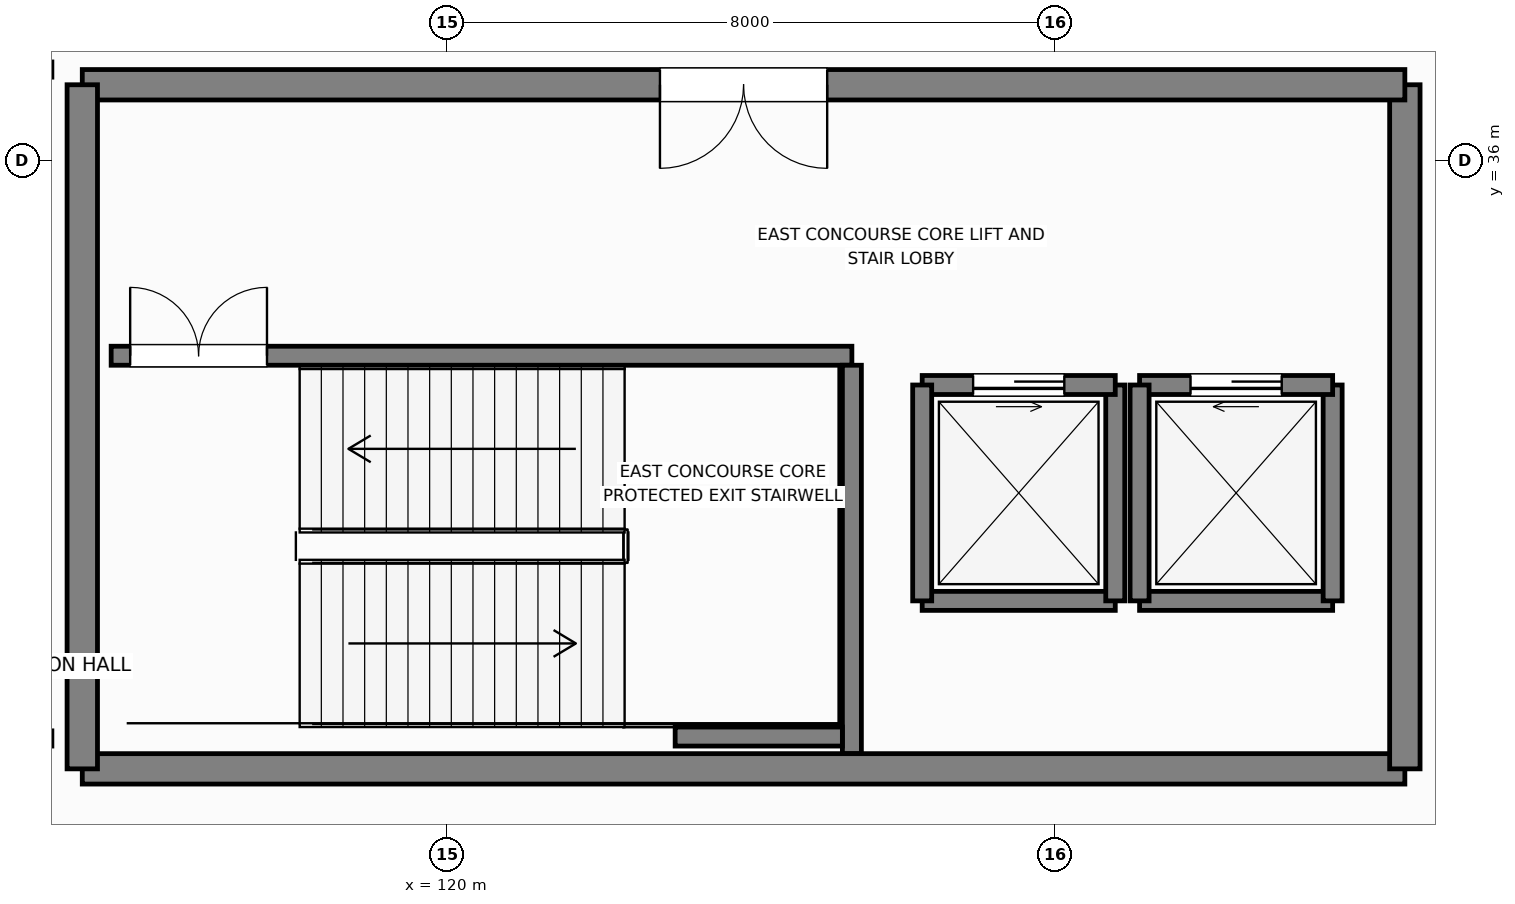
"""IFC4 building model, lengths in metres.
Left out: names, types, materials, properties, quantities, classifications, styles, units other than length and angle.
Written with IfcOpenShell. Run it as: python <this file> out.ifc"""

import sys

from ifc_helpers import new_model, si_unit, direction, frame, frame_2d, origin, place, context, subcontext, project, spatial, rectangle, extrude, element, fill, save


model = new_model("IFC4")
c1 = context("Model", 3, precision=1e-05, world=origin(), true_north=direction((0.0, 1.0)))
c2 = subcontext(c1, "Body", "Model", "MODEL_VIEW")
j1 = project(units=[si_unit("LENGTHUNIT", "METRE"), si_unit("PLANEANGLEUNIT", "RADIAN")], contexts=[c1])
p1 = place(None, origin())
s1 = spatial("IfcSite", under=j1, at=p1, CompositionType="ELEMENT")
p2 = place(p1, origin())
s2 = spatial("IfcBuilding", under=s1, at=p2, CompositionType="ELEMENT")
p3 = place(p2, frame((0.0, 0.0, -5.4)))
s3 = spatial("IfcBuildingStorey", under=s2, at=p3, CompositionType="ELEMENT", Elevation=-5.4)
p4 = place(p3, frame((126.25, 30.21, 0.0), z_axis=(0.0, 0.0, 1.0), x_axis=(1.0, 0.0, 0.0)))
e1 = element("IfcWall", 1, at=p4, inside=s3, PredefinedType="SOLIDWALL", context=c2, shape_type="SweptSolid", body=[
    extrude(rectangle(XDim=2.54, YDim=0.25, at=frame_2d((1.27, 0.0))), origin(), (0.0, 0.0, 1.0), 5.02),
])
p5 = place(p3, frame((128.79, 30.21, 0.0), z_axis=(0.0, 0.0, 1.0), x_axis=(0.0, 1.0, 0.0)))
e2 = element("IfcWall", 2, at=p5, inside=s3, PredefinedType="SOLIDWALL", context=c2, shape_type="SweptSolid", body=[
    extrude(rectangle(XDim=2.84, YDim=0.25, at=frame_2d((1.42, 0.0))), origin(), (0.0, 0.0, 1.0), 5.02),
])
p6 = place(p3, frame((128.79, 33.05, 0.0), z_axis=(0.0, 0.0, 1.0), x_axis=(-1.0, 0.0, 0.0)))
e3 = element("IfcWall", 3, at=p6, inside=s3, PredefinedType="SOLIDWALL", context=c2, shape_type="SweptSolid", body=[
    extrude(rectangle(XDim=2.54, YDim=0.25, at=frame_2d((1.27, 0.0))), origin(), (0.0, 0.0, 1.0), 5.02),
])
p7 = place(p6, frame((0.67, 0.0, 0.0)))
e4 = element("IfcOpeningElement", 4, at=p7, cuts=e3, PredefinedType="OPENING", context=c2, shape_type="SweptSolid", body=[
    extrude(rectangle(XDim=1.2, YDim=2.2, at=frame_2d((0.6, 1.1))), frame((0.0, 0.135, 0.0), z_axis=(0.0, -1.0, 0.0), x_axis=(1.0, 0.0, 0.0)), (0.0, 0.0, 1.0), 0.27),
])
p8 = place(p3, frame((126.25, 33.05, 0.0), z_axis=(0.0, 0.0, 1.0), x_axis=(0.0, -1.0, 0.0)))
e5 = element("IfcWall", 5, at=p8, inside=s3, PredefinedType="SOLIDWALL", context=c2, shape_type="SweptSolid", body=[
    extrude(rectangle(XDim=2.84, YDim=0.25, at=frame_2d((1.42, 0.0))), origin(), (0.0, 0.0, 1.0), 5.02),
])
p9 = place(p3, frame((129.11, 30.21, 0.0), z_axis=(0.0, 0.0, 1.0), x_axis=(1.0, 0.0, 0.0)))
e6 = element("IfcWall", 6, at=p9, inside=s3, PredefinedType="SOLIDWALL", context=c2, shape_type="SweptSolid", body=[
    extrude(rectangle(XDim=2.54, YDim=0.25, at=frame_2d((1.27, 0.0))), origin(), (0.0, 0.0, 1.0), 5.02),
])
p10 = place(p3, frame((131.65, 30.21, 0.0), z_axis=(0.0, 0.0, 1.0), x_axis=(0.0, 1.0, 0.0)))
e7 = element("IfcWall", 7, at=p10, inside=s3, PredefinedType="SOLIDWALL", context=c2, shape_type="SweptSolid", body=[
    extrude(rectangle(XDim=2.84, YDim=0.25, at=frame_2d((1.42, 0.0))), origin(), (0.0, 0.0, 1.0), 5.02),
])
p11 = place(p3, frame((131.65, 33.05, 0.0), z_axis=(0.0, 0.0, 1.0), x_axis=(-1.0, 0.0, 0.0)))
e8 = element("IfcWall", 8, at=p11, inside=s3, PredefinedType="SOLIDWALL", context=c2, shape_type="SweptSolid", body=[
    extrude(rectangle(XDim=2.54, YDim=0.25, at=frame_2d((1.27, 0.0))), origin(), (0.0, 0.0, 1.0), 5.02),
])
p12 = place(p11, frame((0.67, 0.0, 0.0)))
e9 = element("IfcOpeningElement", 9, at=p12, cuts=e8, PredefinedType="OPENING", context=c2, shape_type="SweptSolid", body=[
    extrude(rectangle(XDim=1.2, YDim=2.2, at=frame_2d((0.6, 1.1))), frame((0.0, 0.135, 0.0), z_axis=(0.0, -1.0, 0.0), x_axis=(1.0, 0.0, 0.0)), (0.0, 0.0, 1.0), 0.27),
])
p13 = place(p3, frame((129.11, 33.05, 0.0), z_axis=(0.0, 0.0, 1.0), x_axis=(0.0, -1.0, 0.0)))
e10 = element("IfcWall", 10, at=p13, inside=s3, PredefinedType="SOLIDWALL", context=c2, shape_type="SweptSolid", body=[
    extrude(rectangle(XDim=2.84, YDim=0.25, at=frame_2d((1.42, 0.0))), origin(), (0.0, 0.0, 1.0), 5.02),
])
p14 = place(p3, frame((115.58, 33.435, 0.0), z_axis=(0.0, 0.0, 1.0), x_axis=(1.0, 0.0, 0.0)))
e11 = element("IfcWall", 11, at=p14, inside=s3, PredefinedType="SOLIDWALL", context=c2, shape_type="SweptSolid", body=[
    extrude(rectangle(XDim=9.745, YDim=0.25, at=frame_2d((4.872, 0.0))), origin(), (0.0, 0.0, 1.0), 5.02),
])
p15 = place(p14, frame((0.25, 0.0, 0.0)))
e12 = element("IfcOpeningElement", 12, at=p15, cuts=e11, PredefinedType="OPENING", context=c2, shape_type="SweptSolid", body=[
    extrude(rectangle(XDim=1.8, YDim=2.25, at=frame_2d((0.9, 1.125))), frame((0.0, 0.135, 0.0), z_axis=(0.0, -1.0, 0.0), x_axis=(1.0, 0.0, 0.0)), (0.0, 0.0, 1.0), 0.27),
])
p16 = place(p3, frame((125.325, 28.2, 0.0), z_axis=(0.0, 0.0, 1.0), x_axis=(0.0, 1.0, 0.0)))
e13 = element("IfcWall", 13, at=p16, inside=s3, PredefinedType="SOLIDWALL", context=c2, shape_type="SweptSolid", body=[
    extrude(rectangle(XDim=5.11, YDim=0.25, at=frame_2d((2.555, 0.0))), origin(), (0.0, 0.0, 1.0), 5.02),
])
p17 = place(p3, frame((123.0, 28.425, 0.0), z_axis=(0.0, 0.0, 1.0), x_axis=(1.0, 0.0, 0.0)))
e14 = element("IfcWall", 14, at=p17, inside=s3, PredefinedType="SOLIDWALL", context=c2, shape_type="SweptSolid", body=[
    extrude(rectangle(XDim=2.2, YDim=0.25, at=frame_2d((1.1, 0.0))), origin(), (0.0, 0.0, 1.0), 5.02),
])
p18 = place(p3, frame((115.2, 28.0, 0.0), z_axis=(0.0, 0.0, 1.0), x_axis=(1.0, 0.0, 0.0)))
e15 = element("IfcWall", 15, at=p18, inside=s3, PredefinedType="SHEAR", context=c2, shape_type="SweptSolid", body=[
    extrude(rectangle(XDim=17.4, YDim=0.4, at=frame_2d((8.7, 0.0))), origin(), (0.0, 0.0, 1.0), 5.02),
])
p19 = place(p3, frame((132.6, 28.0, 0.0), z_axis=(0.0, 0.0, 1.0), x_axis=(0.0, 1.0, 0.0)))
e16 = element("IfcWall", 16, at=p19, inside=s3, PredefinedType="SHEAR", context=c2, shape_type="SweptSolid", body=[
    extrude(rectangle(XDim=9.0, YDim=0.4, at=frame_2d((4.5, 0.0))), origin(), (0.0, 0.0, 1.0), 5.02),
])
p20 = place(p3, frame((132.6, 37.0, 0.0), z_axis=(0.0, 0.0, 1.0), x_axis=(-1.0, 0.0, 0.0)))
e17 = element("IfcWall", 17, at=p20, inside=s3, PredefinedType="SHEAR", context=c2, shape_type="SweptSolid", body=[
    extrude(rectangle(XDim=17.4, YDim=0.4, at=frame_2d((8.7, 0.0))), origin(), (0.0, 0.0, 1.0), 5.02),
])
p21 = place(p20, frame((7.6, 0.0, 0.0)))
e18 = element("IfcOpeningElement", 18, at=p21, cuts=e17, PredefinedType="OPENING", context=c2, shape_type="SweptSolid", body=[
    extrude(rectangle(XDim=2.2, YDim=2.3, at=frame_2d((1.1, 1.15))), frame((0.0, 0.21, 0.0), z_axis=(0.0, -1.0, 0.0), x_axis=(1.0, 0.0, 0.0)), (0.0, 0.0, 1.0), 0.42),
])
p22 = place(p3, frame((115.2, 37.0, 0.0), z_axis=(0.0, 0.0, 1.0), x_axis=(0.0, -1.0, 0.0)))
e19 = element("IfcWall", 19, at=p22, inside=s3, PredefinedType="SHEAR", context=c2, shape_type="SweptSolid", body=[
    extrude(rectangle(XDim=9.0, YDim=0.4, at=frame_2d((4.5, 0.0))), origin(), (0.0, 0.0, 1.0), 5.02),
])
p23 = place(p3, frame((92.2, 37.2, 0.0), z_axis=(0.0, 0.0, 1.0), x_axis=(1.0, 0.0, 0.0)))
e20 = element("IfcWall", 20, at=p23, inside=s3, PredefinedType="PARTITIONING", context=c2, shape_type="SweptSolid", body=[
    extrude(rectangle(XDim=22.6, YDim=0.2, at=frame_2d((11.3, 0.0))), origin(), (0.0, 0.0, 1.0), 4.625),
])
p24 = place(p23, frame((7.525, 0.0, 0.0)))
e21 = element("IfcOpeningElement", 21, at=p24, cuts=e20, PredefinedType="OPENING", context=c2, shape_type="SweptSolid", body=[
    extrude(rectangle(XDim=1.1, YDim=2.2, at=frame_2d((0.55, 1.1))), frame((0.0, 0.11, 0.0), z_axis=(0.0, -1.0, 0.0), x_axis=(1.0, 0.0, 0.0)), (0.0, 0.0, 1.0), 0.22),
])
p25 = place(p7, origin())
e22 = element("IfcDoor", 22, at=p25, inside=s3, OperationType="SLIDING_TO_LEFT", PredefinedType="DOOR", context=c2, shape_type="SweptSolid", body=[
    extrude(rectangle(XDim=1.2, YDim=2.2, at=frame_2d((0.6, 1.1))), frame((0.0, 0.025, 0.0), z_axis=(0.0, -1.0, 0.0), x_axis=(1.0, 0.0, 0.0)), (0.0, 0.0, 1.0), 0.05),
])
fill(e4, e22)
p26 = place(p12, origin())
e23 = element("IfcDoor", 23, at=p26, inside=s3, OperationType="SLIDING_TO_RIGHT", PredefinedType="DOOR", context=c2, shape_type="SweptSolid", body=[
    extrude(rectangle(XDim=1.2, YDim=2.2, at=frame_2d((0.6, 1.1))), frame((0.0, 0.025, 0.0), z_axis=(0.0, -1.0, 0.0), x_axis=(1.0, 0.0, 0.0)), (0.0, 0.0, 1.0), 0.05),
])
fill(e9, e23)
p27 = place(p15, origin())
e24 = element("IfcDoor", 24, at=p27, inside=s3, OperationType="DOUBLE_DOOR_SINGLE_SWING", PredefinedType="DOOR", context=c2, shape_type="SweptSolid", body=[
    extrude(rectangle(XDim=1.8, YDim=2.25, at=frame_2d((0.9, 1.125))), frame((0.0, 0.025, 0.0), z_axis=(0.0, -1.0, 0.0), x_axis=(1.0, 0.0, 0.0)), (0.0, 0.0, 1.0), 0.05),
])
fill(e12, e24)
p28 = place(p21, origin())
e25 = element("IfcDoor", 25, at=p28, inside=s3, OperationType="DOUBLE_DOOR_SINGLE_SWING", PredefinedType="DOOR", context=c2, shape_type="SweptSolid", body=[
    extrude(rectangle(XDim=2.2, YDim=2.3, at=frame_2d((1.1, 1.15))), frame((0.0, 0.025, 0.0), z_axis=(0.0, -1.0, 0.0), x_axis=(1.0, 0.0, 0.0)), (0.0, 0.0, 1.0), 0.05),
])
fill(e18, e25)
save(model, sys.argv[1])
